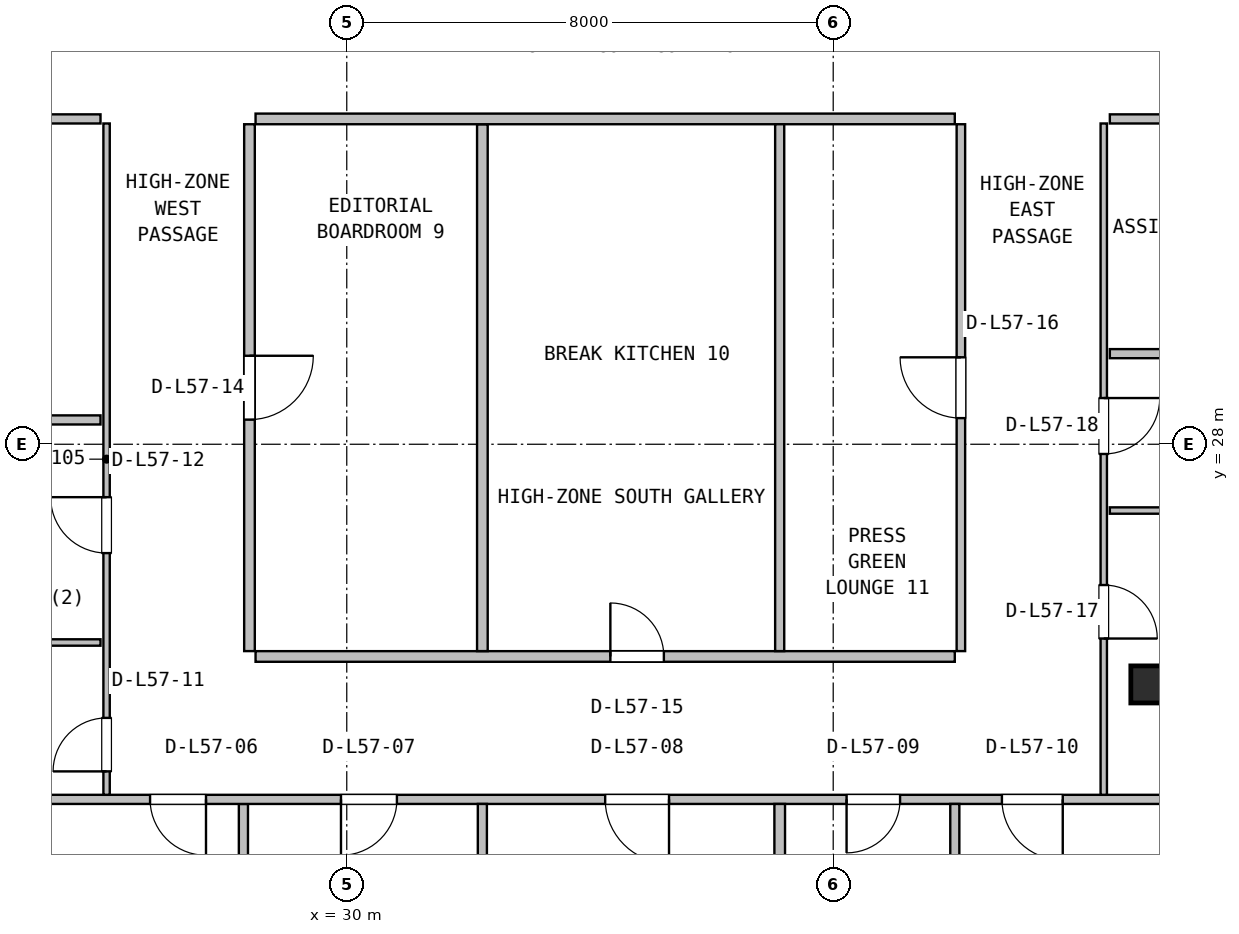
"""IFC4 building model, lengths in metres.
Left out: names, types, materials, properties, quantities, classifications, styles, units other than length and angle.
Written with IfcOpenShell. Run it as: python <this file> out.ifc"""

import sys

from ifc_helpers import new_model, si_unit, direction, frame, frame_2d, origin, origin_2d, place, context, subcontext, project, spatial, rectangle, hollow_circle, extrude, source, transform, mapped, element, fill, save


model = new_model("IFC4")
c1 = context("Model", 3, precision=1e-05, world=origin(), true_north=direction((0.0, 1.0)))
c2 = subcontext(c1, "Body", "Model", "MODEL_VIEW")
j1 = project(units=[si_unit("LENGTHUNIT", "METRE"), si_unit("PLANEANGLEUNIT", "RADIAN")], contexts=[c1])
p1 = place(None, origin())
s1 = spatial("IfcSite", under=j1, at=p1, CompositionType="ELEMENT")
p2 = place(p1, origin())
s2 = spatial("IfcBuilding", under=s1, at=p2, CompositionType="ELEMENT")
p3 = place(p2, frame((0.0, 0.0, 230.2)))
s3 = spatial("IfcBuildingStorey", under=s2, at=p3, CompositionType="ELEMENT", Elevation=230.2)
m1 = source(origin(), c2, "Body", "SweptSolid", [
    extrude(hollow_circle(Radius=0.305, WallThickness=0.025, at=origin_2d()), origin(), (0.0, 0.0, 1.0), 3.8),
])
p4 = place(p3, frame((43.2, 24.05, 0.0), z_axis=(0.0, 0.0, 1.0), x_axis=(1.0, 0.0, 0.0)))
e1 = element("IfcColumn", 1, at=p4, inside=s3, PredefinedType="COLUMN", context=c2, shape_type="MappedRepresentation", body=[
    mapped(m1, transform((0.0, 0.0, 0.0), x_axis=(1.0, 0.0, 0.0), y_axis=(0.0, 1.0, 0.0), z_axis=(0.0, 0.0, 1.0), scale=1.0)),
])
p5 = place(p3, frame((28.3, 10.38, 0.0), z_axis=(0.0, 0.0, 1.0), x_axis=(0.0, 1.0, 0.0)))
e2 = element("IfcWall", 2, at=p5, inside=s3, PredefinedType="PARTITIONING", context=c2, shape_type="SweptSolid", body=[
    extrude(rectangle(XDim=11.705, YDim=0.15, at=frame_2d((5.853, 0.0))), origin(), (0.0, 0.0, 1.0), 2.682),
])
p6 = place(p3, frame((9.68, 22.16, 0.0), z_axis=(0.0, 0.0, 1.0), x_axis=(1.0, 0.0, 0.0)))
e3 = element("IfcWall", 3, at=p6, inside=s3, PredefinedType="PARTITIONING", context=c2, shape_type="SweptSolid", body=[
    extrude(rectangle(XDim=48.64, YDim=0.15, at=frame_2d((24.32, 0.0))), origin(), (0.0, 0.0, 1.0), 2.838),
])
p7 = place(p6, frame((17.085, 0.0, 0.0)))
e4 = element("IfcOpeningElement", 4, at=p7, cuts=e3, PredefinedType="OPENING", context=c2, shape_type="SweptSolid", body=[
    extrude(rectangle(XDim=0.92, YDim=2.08, at=frame_2d((0.46, 1.04))), frame((0.0, 0.085, 0.0), z_axis=(0.0, -1.0, 0.0), x_axis=(1.0, 0.0, 0.0)), (0.0, 0.0, 1.0), 0.17),
])
p8 = place(p6, frame((20.225, 0.0, 0.0)))
e5 = element("IfcOpeningElement", 5, at=p8, cuts=e3, PredefinedType="OPENING", context=c2, shape_type="SweptSolid", body=[
    extrude(rectangle(XDim=0.92, YDim=2.08, at=frame_2d((0.46, 1.04))), frame((0.0, 0.085, 0.0), z_axis=(0.0, -1.0, 0.0), x_axis=(1.0, 0.0, 0.0)), (0.0, 0.0, 1.0), 0.17),
])
p9 = place(p6, frame((24.57, 0.0, 0.0)))
e6 = element("IfcOpeningElement", 6, at=p9, cuts=e3, PredefinedType="OPENING", context=c2, shape_type="SweptSolid", body=[
    extrude(rectangle(XDim=1.05, YDim=2.1, at=frame_2d((0.525, 1.05))), frame((0.0, 0.085, 0.0), z_axis=(0.0, -1.0, 0.0), x_axis=(1.0, 0.0, 0.0)), (0.0, 0.0, 1.0), 0.17),
])
p10 = place(p6, frame((28.54, 0.0, 0.0)))
e7 = element("IfcOpeningElement", 7, at=p10, cuts=e3, PredefinedType="OPENING", context=c2, shape_type="SweptSolid", body=[
    extrude(rectangle(XDim=0.88, YDim=2.06, at=frame_2d((0.44, 1.03))), frame((0.0, 0.085, 0.0), z_axis=(0.0, -1.0, 0.0), x_axis=(1.0, 0.0, 0.0)), (0.0, 0.0, 1.0), 0.17),
])
p11 = place(p6, frame((31.095, 0.0, 0.0)))
e8 = element("IfcOpeningElement", 8, at=p11, cuts=e3, PredefinedType="OPENING", context=c2, shape_type="SweptSolid", body=[
    extrude(rectangle(XDim=1.0, YDim=2.1, at=frame_2d((0.5, 1.05))), frame((0.0, 0.085, 0.0), z_axis=(0.0, -1.0, 0.0), x_axis=(1.0, 0.0, 0.0)), (0.0, 0.0, 1.0), 0.17),
])
p12 = place(p3, frame((32.23, 10.38, 0.0), z_axis=(0.0, 0.0, 1.0), x_axis=(0.0, 1.0, 0.0)))
e9 = element("IfcWall", 9, at=p12, inside=s3, PredefinedType="PARTITIONING", context=c2, shape_type="SweptSolid", body=[
    extrude(rectangle(XDim=11.705, YDim=0.15, at=frame_2d((5.853, 0.0))), origin(), (0.0, 0.0, 1.0), 2.682),
])
p13 = place(p3, frame((37.12, 10.38, 0.0), z_axis=(0.0, 0.0, 1.0), x_axis=(0.0, 1.0, 0.0)))
e10 = element("IfcWall", 10, at=p13, inside=s3, PredefinedType="PARTITIONING", context=c2, shape_type="SweptSolid", body=[
    extrude(rectangle(XDim=11.705, YDim=0.175, at=frame_2d((5.853, 0.0))), origin(), (0.0, 0.0, 1.0), 2.682),
])
p14 = place(p3, frame((40.0, 10.38, 0.0), z_axis=(0.0, 0.0, 1.0), x_axis=(0.0, 1.0, 0.0)))
e11 = element("IfcWall", 11, at=p14, inside=s3, PredefinedType="PARTITIONING", context=c2, shape_type="SweptSolid", body=[
    extrude(rectangle(XDim=11.705, YDim=0.15, at=frame_2d((5.853, 0.0))), origin(), (0.0, 0.0, 1.0), 2.682),
])
p15 = place(p3, frame((26.05, 22.235, 0.0), z_axis=(0.0, 0.0, 1.0), x_axis=(0.0, 1.0, 0.0)))
e12 = element("IfcWall", 12, at=p15, inside=s3, PredefinedType="PARTITIONING", context=c2, shape_type="SweptSolid", body=[
    extrude(rectangle(XDim=11.04, YDim=0.105, at=frame_2d((5.52, 0.0))), origin(), (0.0, 0.0, 1.0), 2.838),
])
p16 = place(p15, frame((0.385, 0.0, 0.0)))
e13 = element("IfcOpeningElement", 13, at=p16, cuts=e12, PredefinedType="OPENING", context=c2, shape_type="SweptSolid", body=[
    extrude(rectangle(XDim=0.88, YDim=2.06, at=frame_2d((0.44, 1.03))), frame((0.0, 0.062, 0.0), z_axis=(0.0, -1.0, 0.0), x_axis=(1.0, 0.0, 0.0)), (0.0, 0.0, 1.0), 0.125),
])
p17 = place(p15, frame((3.975, 0.0, 0.0)))
e14 = element("IfcOpeningElement", 14, at=p17, cuts=e12, PredefinedType="OPENING", context=c2, shape_type="SweptSolid", body=[
    extrude(rectangle(XDim=0.92, YDim=2.08, at=frame_2d((0.46, 1.04))), frame((0.0, 0.062, 0.0), z_axis=(0.0, -1.0, 0.0), x_axis=(1.0, 0.0, 0.0)), (0.0, 0.0, 1.0), 0.125),
])
p18 = place(p3, frame((9.68, 24.74, 0.0), z_axis=(0.0, 0.0, 1.0), x_axis=(1.0, 0.0, 0.0)))
e15 = element("IfcWall", 15, at=p18, inside=s3, PredefinedType="PARTITIONING", context=c2, shape_type="SweptSolid", body=[
    extrude(rectangle(XDim=16.27, YDim=0.105, at=frame_2d((8.135, 0.0))), origin(), (0.0, 0.0, 1.0), 2.838),
])
p19 = place(p3, frame((9.68, 28.4, 0.0), z_axis=(0.0, 0.0, 1.0), x_axis=(1.0, 0.0, 0.0)))
e16 = element("IfcWall", 16, at=p19, inside=s3, PredefinedType="PARTITIONING", context=c2, shape_type="SweptSolid", body=[
    extrude(rectangle(XDim=16.27, YDim=0.15, at=frame_2d((8.135, 0.0))), origin(), (0.0, 0.0, 1.0), 2.838),
])
p20 = place(p3, frame((9.68, 33.35, 0.0), z_axis=(0.0, 0.0, 1.0), x_axis=(1.0, 0.0, 0.0)))
e17 = element("IfcWall", 17, at=p20, inside=s3, PredefinedType="PARTITIONING", context=c2, shape_type="SweptSolid", body=[
    extrude(rectangle(XDim=16.27, YDim=0.15, at=frame_2d((8.135, 0.0))), origin(), (0.0, 0.0, 1.0), 2.838),
])
p21 = place(p20, frame((9.51, 0.0, 0.0)))
e18 = element("IfcOpeningElement", 18, at=p21, cuts=e17, PredefinedType="OPENING", context=c2, shape_type="SweptSolid", body=[
    extrude(rectangle(XDim=0.92, YDim=2.08, at=frame_2d((0.46, 1.04))), frame((0.0, 0.085, 0.0), z_axis=(0.0, -1.0, 0.0), x_axis=(1.0, 0.0, 0.0)), (0.0, 0.0, 1.0), 0.17),
])
p22 = place(p3, frame((28.5, 24.51, 0.0), z_axis=(0.0, 0.0, 1.0), x_axis=(1.0, 0.0, 0.0)))
e19 = element("IfcWall", 19, at=p22, inside=s3, PredefinedType="PARTITIONING", context=c2, shape_type="SweptSolid", body=[
    extrude(rectangle(XDim=11.5, YDim=0.175, at=frame_2d((5.75, 0.0))), origin(), (0.0, 0.0, 1.0), 2.838),
])
p23 = place(p22, frame((5.835, 0.0, 0.0)))
e20 = element("IfcOpeningElement", 20, at=p23, cuts=e19, PredefinedType="OPENING", context=c2, shape_type="SweptSolid", body=[
    extrude(rectangle(XDim=0.88, YDim=2.06, at=frame_2d((0.44, 1.03))), frame((0.0, 0.098, 0.0), z_axis=(0.0, -1.0, 0.0), x_axis=(1.0, 0.0, 0.0)), (0.0, 0.0, 1.0), 0.195),
])
p24 = place(p3, frame((32.23, 24.598, 0.0), z_axis=(0.0, 0.0, 1.0), x_axis=(0.0, 1.0, 0.0)))
e21 = element("IfcWall", 21, at=p24, inside=s3, PredefinedType="PARTITIONING", context=c2, shape_type="SweptSolid", body=[
    extrude(rectangle(XDim=8.665, YDim=0.175, at=frame_2d((4.333, 0.0))), origin(), (0.0, 0.0, 1.0), 3.152),
])
p25 = place(p3, frame((28.5, 33.35, 0.0), z_axis=(0.0, 0.0, 1.0), x_axis=(1.0, 0.0, 0.0)))
e22 = element("IfcWall", 22, at=p25, inside=s3, PredefinedType="PARTITIONING", context=c2, shape_type="SweptSolid", body=[
    extrude(rectangle(XDim=11.5, YDim=0.175, at=frame_2d((5.75, 0.0))), origin(), (0.0, 0.0, 1.0), 2.838),
])
p26 = place(p3, frame((28.4, 24.598, 0.0), z_axis=(0.0, 0.0, 1.0), x_axis=(0.0, 1.0, 0.0)))
e23 = element("IfcWall", 23, at=p26, inside=s3, PredefinedType="PARTITIONING", context=c2, shape_type="SweptSolid", body=[
    extrude(rectangle(XDim=8.665, YDim=0.175, at=frame_2d((4.333, 0.0))), origin(), (0.0, 0.0, 1.0), 3.152),
])
p27 = place(p26, frame((3.807, 0.0, 0.0)))
e24 = element("IfcOpeningElement", 24, at=p27, cuts=e23, PredefinedType="OPENING", context=c2, shape_type="SweptSolid", body=[
    extrude(rectangle(XDim=1.05, YDim=2.1, at=frame_2d((0.525, 1.05))), frame((0.0, 0.098, 0.0), z_axis=(0.0, -1.0, 0.0), x_axis=(1.0, 0.0, 0.0)), (0.0, 0.0, 1.0), 0.195),
])
p28 = place(p3, frame((37.12, 24.598, 0.0), z_axis=(0.0, 0.0, 1.0), x_axis=(0.0, 1.0, 0.0)))
e25 = element("IfcWall", 25, at=p28, inside=s3, PredefinedType="PARTITIONING", context=c2, shape_type="SweptSolid", body=[
    extrude(rectangle(XDim=8.665, YDim=0.15, at=frame_2d((4.333, 0.0))), origin(), (0.0, 0.0, 1.0), 3.152),
])
p29 = place(p3, frame((40.1, 24.598, 0.0), z_axis=(0.0, 0.0, 1.0), x_axis=(0.0, 1.0, 0.0)))
e26 = element("IfcWall", 26, at=p29, inside=s3, PredefinedType="PARTITIONING", context=c2, shape_type="SweptSolid", body=[
    extrude(rectangle(XDim=8.665, YDim=0.14, at=frame_2d((4.333, 0.0))), origin(), (0.0, 0.0, 1.0), 3.152),
])
p30 = place(p29, frame((3.832, 0.0, 0.0)))
e27 = element("IfcOpeningElement", 27, at=p30, cuts=e26, PredefinedType="OPENING", context=c2, shape_type="SweptSolid", body=[
    extrude(rectangle(XDim=1.0, YDim=2.1, at=frame_2d((0.5, 1.05))), frame((0.0, 0.08, 0.0), z_axis=(0.0, -1.0, 0.0), x_axis=(1.0, 0.0, 0.0)), (0.0, 0.0, 1.0), 0.16),
])
p31 = place(p3, frame((42.55, 26.91, 0.0), z_axis=(0.0, 0.0, 1.0), x_axis=(1.0, 0.0, 0.0)))
e28 = element("IfcWall", 28, at=p31, inside=s3, PredefinedType="PARTITIONING", context=c2, shape_type="SweptSolid", body=[
    extrude(rectangle(XDim=15.77, YDim=0.105, at=frame_2d((7.885, 0.0))), origin(), (0.0, 0.0, 1.0), 2.838),
])
p32 = place(p3, frame((42.45, 22.235, 0.0), z_axis=(0.0, 0.0, 1.0), x_axis=(0.0, 1.0, 0.0)))
e29 = element("IfcWall", 29, at=p32, inside=s3, PredefinedType="PARTITIONING", context=c2, shape_type="SweptSolid", body=[
    extrude(rectangle(XDim=11.04, YDim=0.105, at=frame_2d((5.52, 0.0))), origin(), (0.0, 0.0, 1.0), 2.838),
])
p33 = place(p32, frame((2.57, 0.0, 0.0)))
e30 = element("IfcOpeningElement", 30, at=p33, cuts=e29, PredefinedType="OPENING", context=c2, shape_type="SweptSolid", body=[
    extrude(rectangle(XDim=0.88, YDim=2.06, at=frame_2d((0.44, 1.03))), frame((0.0, 0.062, 0.0), z_axis=(0.0, -1.0, 0.0), x_axis=(1.0, 0.0, 0.0)), (0.0, 0.0, 1.0), 0.125),
])
p34 = place(p32, frame((5.605, 0.0, 0.0)))
e31 = element("IfcOpeningElement", 31, at=p34, cuts=e29, PredefinedType="OPENING", context=c2, shape_type="SweptSolid", body=[
    extrude(rectangle(XDim=0.92, YDim=2.08, at=frame_2d((0.46, 1.04))), frame((0.0, 0.062, 0.0), z_axis=(0.0, -1.0, 0.0), x_axis=(1.0, 0.0, 0.0)), (0.0, 0.0, 1.0), 0.125),
])
p35 = place(p3, frame((42.55, 29.49, 0.0), z_axis=(0.0, 0.0, 1.0), x_axis=(1.0, 0.0, 0.0)))
e32 = element("IfcWall", 32, at=p35, inside=s3, PredefinedType="PARTITIONING", context=c2, shape_type="SweptSolid", body=[
    extrude(rectangle(XDim=15.77, YDim=0.15, at=frame_2d((7.885, 0.0))), origin(), (0.0, 0.0, 1.0), 2.838),
])
p36 = place(p3, frame((42.55, 33.35, 0.0), z_axis=(0.0, 0.0, 1.0), x_axis=(1.0, 0.0, 0.0)))
e33 = element("IfcWall", 33, at=p36, inside=s3, PredefinedType="PARTITIONING", context=c2, shape_type="SweptSolid", body=[
    extrude(rectangle(XDim=15.77, YDim=0.15, at=frame_2d((7.885, 0.0))), origin(), (0.0, 0.0, 1.0), 2.838),
])
p37 = place(p36, frame((5.59, 0.0, 0.0)))
e34 = element("IfcOpeningElement", 34, at=p37, cuts=e33, PredefinedType="OPENING", context=c2, shape_type="SweptSolid", body=[
    extrude(rectangle(XDim=0.92, YDim=2.08, at=frame_2d((0.46, 1.04))), frame((0.0, 0.085, 0.0), z_axis=(0.0, -1.0, 0.0), x_axis=(1.0, 0.0, 0.0)), (0.0, 0.0, 1.0), 0.17),
])
m2 = source(origin(), c2, "Body", "SweptSolid", [
    extrude(rectangle(XDim=0.92, YDim=2.08, at=frame_2d((0.46, 1.04))), frame((0.0, 0.025, 0.0), z_axis=(0.0, -1.0, 0.0), x_axis=(1.0, 0.0, 0.0)), (0.0, 0.0, 1.0), 0.05),
])
p38 = place(p7, frame((0.92, 0.0, 0.0), z_axis=(0.0, 0.0, 1.0), x_axis=(-1.0, 0.0, 0.0)))
e35 = element("IfcDoor", 35, at=p38, inside=s3, OperationType="SINGLE_SWING_RIGHT", PredefinedType="DOOR", context=c2, shape_type="MappedRepresentation", body=[
    mapped(m2, transform((0.0, 0.0, 0.0), x_axis=(1.0, 0.0, 0.0), y_axis=(0.0, 1.0, 0.0), z_axis=(0.0, 0.0, 1.0), scale=1.0)),
])
fill(e4, e35)
p39 = place(p8, frame((0.92, 0.0, 0.0), z_axis=(0.0, 0.0, 1.0), x_axis=(-1.0, 0.0, 0.0)))
e36 = element("IfcDoor", 36, at=p39, inside=s3, OperationType="SINGLE_SWING_LEFT", PredefinedType="DOOR", context=c2, shape_type="MappedRepresentation", body=[
    mapped(m2, transform((0.0, 0.0, 0.0), x_axis=(1.0, 0.0, 0.0), y_axis=(0.0, 1.0, 0.0), z_axis=(0.0, 0.0, 1.0), scale=1.0)),
])
fill(e5, e36)
m3 = source(origin(), c2, "Body", "SweptSolid", [
    extrude(rectangle(XDim=1.05, YDim=2.1, at=frame_2d((0.525, 1.05))), frame((0.0, 0.025, 0.0), z_axis=(0.0, -1.0, 0.0), x_axis=(1.0, 0.0, 0.0)), (0.0, 0.0, 1.0), 0.05),
])
p40 = place(p9, frame((1.05, 0.0, 0.0), z_axis=(0.0, 0.0, 1.0), x_axis=(-1.0, 0.0, 0.0)))
e37 = element("IfcDoor", 37, at=p40, inside=s3, OperationType="SINGLE_SWING_RIGHT", PredefinedType="DOOR", context=c2, shape_type="MappedRepresentation", body=[
    mapped(m3, transform((0.0, 0.0, 0.0), x_axis=(1.0, 0.0, 0.0), y_axis=(0.0, 1.0, 0.0), z_axis=(0.0, 0.0, 1.0), scale=1.0)),
])
fill(e6, e37)
m4 = source(origin(), c2, "Body", "SweptSolid", [
    extrude(rectangle(XDim=0.88, YDim=2.06, at=frame_2d((0.44, 1.03))), frame((0.0, 0.025, 0.0), z_axis=(0.0, -1.0, 0.0), x_axis=(1.0, 0.0, 0.0)), (0.0, 0.0, 1.0), 0.05),
])
p41 = place(p10, frame((0.88, 0.0, 0.0), z_axis=(0.0, 0.0, 1.0), x_axis=(-1.0, 0.0, 0.0)))
e38 = element("IfcDoor", 38, at=p41, inside=s3, OperationType="SINGLE_SWING_LEFT", PredefinedType="DOOR", context=c2, shape_type="MappedRepresentation", body=[
    mapped(m4, transform((0.0, 0.0, 0.0), x_axis=(1.0, 0.0, 0.0), y_axis=(0.0, 1.0, 0.0), z_axis=(0.0, 0.0, 1.0), scale=1.0)),
])
fill(e7, e38)
m5 = source(origin(), c2, "Body", "SweptSolid", [
    extrude(rectangle(XDim=1.0, YDim=2.1, at=frame_2d((0.5, 1.05))), frame((0.0, 0.025, 0.0), z_axis=(0.0, -1.0, 0.0), x_axis=(1.0, 0.0, 0.0)), (0.0, 0.0, 1.0), 0.05),
])
p42 = place(p11, frame((1.0, 0.0, 0.0), z_axis=(0.0, 0.0, 1.0), x_axis=(-1.0, 0.0, 0.0)))
e39 = element("IfcDoor", 39, at=p42, inside=s3, OperationType="SINGLE_SWING_RIGHT", PredefinedType="DOOR", context=c2, shape_type="MappedRepresentation", body=[
    mapped(m5, transform((0.0, 0.0, 0.0), x_axis=(1.0, 0.0, 0.0), y_axis=(0.0, 1.0, 0.0), z_axis=(0.0, 0.0, 1.0), scale=1.0)),
])
fill(e8, e39)
p43 = place(p16, origin())
e40 = element("IfcDoor", 40, at=p43, inside=s3, OperationType="SINGLE_SWING_LEFT", PredefinedType="DOOR", context=c2, shape_type="MappedRepresentation", body=[
    mapped(m4, transform((0.0, 0.0, 0.0), x_axis=(1.0, 0.0, 0.0), y_axis=(0.0, 1.0, 0.0), z_axis=(0.0, 0.0, 1.0), scale=1.0)),
])
fill(e13, e40)
p44 = place(p17, origin())
e41 = element("IfcDoor", 41, at=p44, inside=s3, OperationType="SINGLE_SWING_RIGHT", PredefinedType="DOOR", context=c2, shape_type="MappedRepresentation", body=[
    mapped(m2, transform((0.0, 0.0, 0.0), x_axis=(1.0, 0.0, 0.0), y_axis=(0.0, 1.0, 0.0), z_axis=(0.0, 0.0, 1.0), scale=1.0)),
])
fill(e14, e41)
p45 = place(p27, frame((1.05, 0.0, 0.0), z_axis=(0.0, 0.0, 1.0), x_axis=(-1.0, 0.0, 0.0)))
e42 = element("IfcDoor", 42, at=p45, inside=s3, OperationType="SINGLE_SWING_RIGHT", PredefinedType="DOOR", context=c2, shape_type="MappedRepresentation", body=[
    mapped(m3, transform((0.0, 0.0, 0.0), x_axis=(1.0, 0.0, 0.0), y_axis=(0.0, 1.0, 0.0), z_axis=(0.0, 0.0, 1.0), scale=1.0)),
])
fill(e24, e42)
p46 = place(p23, origin())
e43 = element("IfcDoor", 43, at=p46, inside=s3, OperationType="SINGLE_SWING_LEFT", PredefinedType="DOOR", context=c2, shape_type="MappedRepresentation", body=[
    mapped(m4, transform((0.0, 0.0, 0.0), x_axis=(1.0, 0.0, 0.0), y_axis=(0.0, 1.0, 0.0), z_axis=(0.0, 0.0, 1.0), scale=1.0)),
])
fill(e20, e43)
p47 = place(p30, origin())
e44 = element("IfcDoor", 44, at=p47, inside=s3, OperationType="SINGLE_SWING_RIGHT", PredefinedType="DOOR", context=c2, shape_type="MappedRepresentation", body=[
    mapped(m5, transform((0.0, 0.0, 0.0), x_axis=(1.0, 0.0, 0.0), y_axis=(0.0, 1.0, 0.0), z_axis=(0.0, 0.0, 1.0), scale=1.0)),
])
fill(e27, e44)
p48 = place(p33, frame((0.88, 0.0, 0.0), z_axis=(0.0, 0.0, 1.0), x_axis=(-1.0, 0.0, 0.0)))
e45 = element("IfcDoor", 45, at=p48, inside=s3, OperationType="SINGLE_SWING_LEFT", PredefinedType="DOOR", context=c2, shape_type="MappedRepresentation", body=[
    mapped(m4, transform((0.0, 0.0, 0.0), x_axis=(1.0, 0.0, 0.0), y_axis=(0.0, 1.0, 0.0), z_axis=(0.0, 0.0, 1.0), scale=1.0)),
])
fill(e30, e45)
p49 = place(p34, frame((0.92, 0.0, 0.0), z_axis=(0.0, 0.0, 1.0), x_axis=(-1.0, 0.0, 0.0)))
e46 = element("IfcDoor", 46, at=p49, inside=s3, OperationType="SINGLE_SWING_RIGHT", PredefinedType="DOOR", context=c2, shape_type="MappedRepresentation", body=[
    mapped(m2, transform((0.0, 0.0, 0.0), x_axis=(1.0, 0.0, 0.0), y_axis=(0.0, 1.0, 0.0), z_axis=(0.0, 0.0, 1.0), scale=1.0)),
])
fill(e31, e46)
save(model, sys.argv[1])
